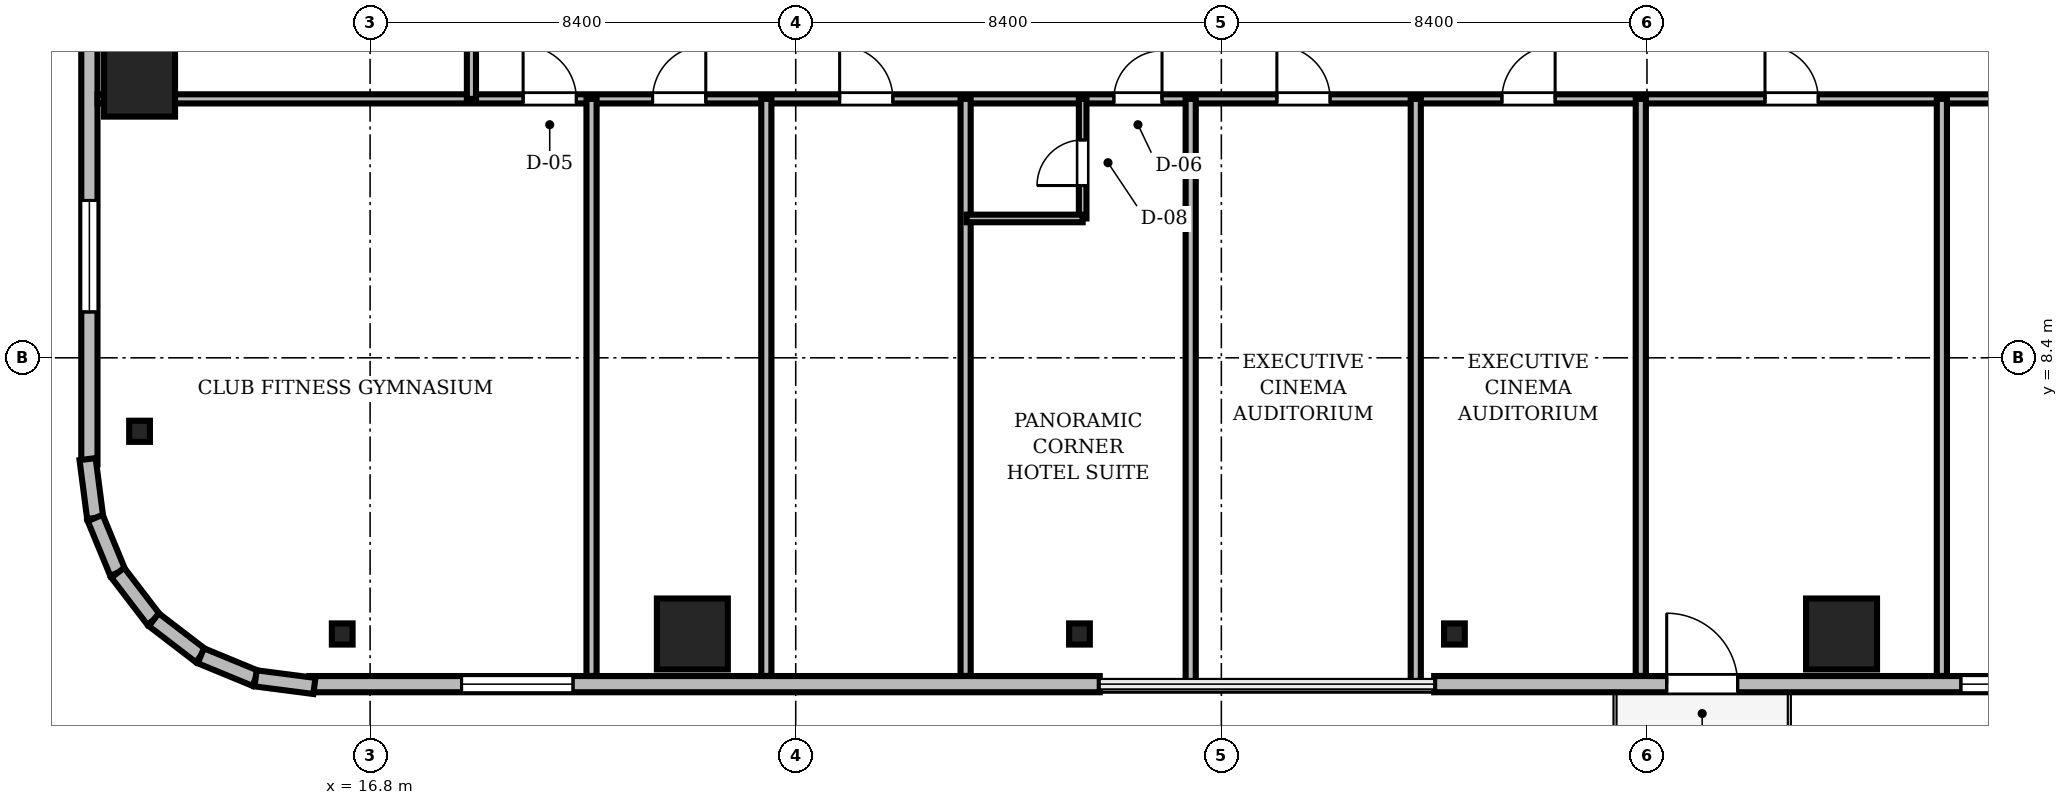
"""IFC4 building model, lengths in metres.
Left out: names, types, materials, properties, quantities, classifications, styles, units other than length and angle.
Written with IfcOpenShell. Run it as: python <this file> out.ifc"""

import sys

from ifc_helpers import new_model, si_unit, direction, frame, frame_2d, origin, origin_2d, place, context, subcontext, project, spatial, rectangle, i_section, extrude, source, transform, mapped, element, fill, save


model = new_model("IFC4")
c1 = context("Model", 3, precision=1e-05, world=origin(), true_north=direction((0.0, 1.0)))
c2 = subcontext(c1, "Body", "Model", "MODEL_VIEW")
j1 = project(units=[si_unit("LENGTHUNIT", "METRE"), si_unit("PLANEANGLEUNIT", "RADIAN")], contexts=[c1])
p1 = place(None, origin())
s1 = spatial("IfcSite", under=j1, at=p1, CompositionType="ELEMENT")
p2 = place(p1, origin())
s2 = spatial("IfcBuilding", under=s1, at=p2, CompositionType="ELEMENT")
p3 = place(p2, frame((0.0, 0.0, 214.8)))
s3 = spatial("IfcBuildingStorey", under=s2, at=p3, CompositionType="ELEMENT", Elevation=214.8)
m1 = source(origin(), c2, "Body", "SweptSolid", [
    extrude(rectangle(XDim=1.4, YDim=1.4, at=origin_2d()), origin(), (0.0, 0.0, 1.0), 3.53),
])
for number, where, z_axis, x_axis in (
    (1, (23.16, 2.95, 0.0), (0.0, 0.0, 1.0), (1.0, 0.0, 0.0)),
    (2, (45.84, 2.95, 0.0), (0.0, 0.0, 1.0), (1.0, 0.0, 0.0)),
    (3, (12.25, 13.86, 0.0), (0.0, 0.0, 1.0), (1.0, 0.0, 0.0)),
):
    element("IfcColumn", number, at=place(p3, frame(where, z_axis=z_axis, x_axis=x_axis)), inside=s3, PredefinedType="COLUMN", context=c2, shape_type="MappedRepresentation", body=[
        mapped(m1, transform((0.0, 0.0, 0.0), scale=1.0)),
    ])
m2 = source(origin(), c2, "Body", "SweptSolid", [
    extrude(i_section(OverallWidth=0.409, OverallDepth=0.417, WebThickness=0.021, FlangeThickness=0.033, FilletRadius=0.015, at=origin_2d()), origin(), (0.0, 0.0, 1.0), 3.53),
])
for number, where, z_axis, x_axis in (
    (4, (16.25, 2.95, 0.0), (0.0, 0.0, 1.0), (1.0, 0.0, 0.0)),
    (5, (30.8, 2.95, 0.0), (0.0, 0.0, 1.0), (1.0, 0.0, 0.0)),
    (6, (38.2, 2.95, 0.0), (0.0, 0.0, 1.0), (1.0, 0.0, 0.0)),
    (7, (12.25, 6.95, 0.0), (0.0, 0.0, 1.0), (1.0, 0.0, 0.0)),
):
    element("IfcColumn", number, at=place(p3, frame(where, z_axis=z_axis, x_axis=x_axis)), inside=s3, PredefinedType="COLUMN", context=c2, shape_type="MappedRepresentation", body=[
        mapped(m2, transform((0.0, 0.0, 0.0), scale=1.0)),
    ])
m3 = source(origin(), c2, "Body", "SweptSolid", [
    extrude(rectangle(XDim=15.6, YDim=0.32, at=frame_2d((7.8, 0.0))), origin(), (0.0, 0.0, 1.0), 3.53),
])
p4 = place(p3, frame((15.6, 1.96, 0.0), z_axis=(0.0, 0.0, 1.0), x_axis=(1.0, 0.0, 0.0)))
e8 = element("IfcWall", 8, at=p4, inside=s3, PredefinedType="SOLIDWALL", context=c2, shape_type="MappedRepresentation", body=[
    mapped(m3, transform((0.0, 0.0, 0.0), scale=1.0)),
])
m4 = source(origin(), c2, "Body", "SweptSolid", [
    extrude(rectangle(XDim=2.2, YDim=2.4, at=frame_2d((1.1, 1.2))), frame((0.0, 0.17, 0.0), z_axis=(0.0, -1.0, 0.0), x_axis=(1.0, 0.0, 0.0)), (0.0, 0.0, 1.0), 0.34),
])
p5 = place(p4, frame((3.005, 0.0, 0.72)))
e9 = element("IfcOpeningElement", 9, at=p5, cuts=e8, PredefinedType="OPENING", context=c2, shape_type="MappedRepresentation", body=[
    mapped(m4, transform((0.0, 0.0, 0.0), scale=1.0)),
])
p6 = place(p3, frame((37.8, 1.96, 0.0), z_axis=(0.0, 0.0, 1.0), x_axis=(1.0, 0.0, 0.0)))
e10 = element("IfcWall", 10, at=p6, inside=s3, PredefinedType="SOLIDWALL", context=c2, shape_type="MappedRepresentation", body=[
    mapped(m3, transform((0.0, 0.0, 0.0), scale=1.0)),
])
m5 = source(origin(), c2, "Body", "SweptSolid", [
    extrude(rectangle(XDim=1.4, YDim=2.3, at=frame_2d((0.7, 1.15))), frame((0.0, 0.17, 0.0), z_axis=(0.0, -1.0, 0.0), x_axis=(1.0, 0.0, 0.0)), (0.0, 0.0, 1.0), 0.34),
])
p7 = place(p6, frame((4.59, 0.0, 0.0)))
e11 = element("IfcOpeningElement", 11, at=p7, cuts=e10, PredefinedType="OPENING", context=c2, shape_type="MappedRepresentation", body=[
    mapped(m5, transform((0.0, 0.0, 0.0), scale=1.0)),
])
p8 = place(p6, frame((10.395, 0.0, 0.72)))
e12 = element("IfcOpeningElement", 12, at=p8, cuts=e10, PredefinedType="OPENING", context=c2, shape_type="MappedRepresentation", body=[
    mapped(m4, transform((0.0, 0.0, 0.0), scale=1.0)),
])
p9 = place(p3, frame((11.26, 21.9, 0.0), z_axis=(0.0, 0.0, 1.0), x_axis=(0.0, -1.0, 0.0)))
e13 = element("IfcWall", 13, at=p9, inside=s3, PredefinedType="SOLIDWALL", context=c2, shape_type="MappedRepresentation", body=[
    mapped(m3, transform((0.0, 0.0, 0.0), scale=1.0)),
])
p10 = place(p9, frame((4.59, 0.0, 0.0)))
e14 = element("IfcOpeningElement", 14, at=p10, cuts=e13, PredefinedType="OPENING", context=c2, shape_type="MappedRepresentation", body=[
    mapped(m5, transform((0.0, 0.0, 0.0), scale=1.0)),
])
p11 = place(p9, frame((10.395, 0.0, 0.72)))
e15 = element("IfcOpeningElement", 15, at=p11, cuts=e13, PredefinedType="OPENING", context=c2, shape_type="MappedRepresentation", body=[
    mapped(m4, transform((0.0, 0.0, 0.0), scale=1.0)),
])
m6 = source(origin(), c2, "Body", "SweptSolid", [
    extrude(rectangle(XDim=1.171, YDim=0.32, at=frame_2d((0.585, 0.0))), origin(), (0.0, 0.0, 1.0), 3.53),
])
p12 = place(p3, frame((11.224, 6.401, 0.0), z_axis=(0.0, 0.0, 1.0), x_axis=(0.128269133229, -0.991739395941, 0.0)))
e16 = element("IfcWall", 16, at=p12, inside=s3, PredefinedType="SOLIDWALL", context=c2, shape_type="MappedRepresentation", body=[
    mapped(m6, transform((0.0, 0.0, 0.0), scale=1.0)),
])
m7 = source(origin(), c2, "Body", "SweptSolid", [
    extrude(rectangle(XDim=1.169, YDim=0.32, at=frame_2d((0.584, 0.0))), origin(), (0.0, 0.0, 1.0), 3.53),
])
for number, where, z_axis, x_axis in (
    (17, (11.375, 5.24, 0.0), (0.0, 0.0, 1.0), (0.381, -0.925, 0.0)),
    (18, (11.82, 4.159, 0.0), (0.0, 0.0, 1.0), (0.608, -0.794, 0.0)),
):
    element("IfcWall", number, at=place(p3, frame(where, z_axis=z_axis, x_axis=x_axis)), inside=s3, PredefinedType="SOLIDWALL", context=c2, shape_type="MappedRepresentation", body=[
        mapped(m7, transform((0.0, 0.0, 0.0), scale=1.0)),
    ])
m8 = source(origin(), c2, "Body", "SweptSolid", [
    extrude(rectangle(XDim=1.169, YDim=0.32, at=frame_2d((0.584, 0.0))), origin(), (0.0, 0.0, 1.0), 3.53),
])
p13 = place(p3, frame((12.531, 3.231, 0.0), z_axis=(0.0, 0.0, 1.0), x_axis=(0.793663520347, -0.608356981114, 0.0)))
e19 = element("IfcWall", 19, at=p13, inside=s3, PredefinedType="SOLIDWALL", context=c2, shape_type="MappedRepresentation", body=[
    mapped(m8, transform((0.0, 0.0, 0.0), scale=1.0)),
])
m9 = source(origin(), c2, "Body", "SweptSolid", [
    extrude(rectangle(XDim=1.169, YDim=0.32, at=frame_2d((0.585, 0.0))), origin(), (0.0, 0.0, 1.0), 3.53),
])
p14 = place(p3, frame((13.459, 2.52, 0.0), z_axis=(0.0, 0.0, 1.0), x_axis=(0.924479075121, -0.381232789334, 0.0)))
e20 = element("IfcWall", 20, at=p14, inside=s3, PredefinedType="SOLIDWALL", context=c2, shape_type="MappedRepresentation", body=[
    mapped(m9, transform((0.0, 0.0, 0.0), scale=1.0)),
])
m10 = source(origin(), c2, "Body", "SweptSolid", [
    extrude(rectangle(XDim=1.17, YDim=0.32, at=frame_2d((0.585, 0.0))), origin(), (0.0, 0.0, 1.0), 3.53),
])
p15 = place(p3, frame((14.54, 2.074, 0.0), z_axis=(0.0, 0.0, 1.0), x_axis=(0.991762485493, -0.128090485085, 0.0)))
e21 = element("IfcWall", 21, at=p15, inside=s3, PredefinedType="SOLIDWALL", context=c2, shape_type="MappedRepresentation", body=[
    mapped(m10, transform((0.0, 0.0, 0.0), scale=1.0)),
])
m11 = source(origin(), c2, "Body", "SweptSolid", [
    extrude(rectangle(XDim=46.156, YDim=0.18, at=frame_2d((23.078, 0.0))), origin(), (0.0, 0.0, 1.0), 2.772),
])
p16 = place(p3, frame((11.422, 13.51, 0.0), z_axis=(0.0, 0.0, 1.0), x_axis=(1.0, 0.0, 0.0)))
e22 = element("IfcWall", 22, at=p16, inside=s3, PredefinedType="PARTITIONING", context=c2, shape_type="MappedRepresentation", body=[
    mapped(m11, transform((0.0, 0.0, 0.0), scale=1.0)),
])
m12 = source(origin(), c2, "Body", "SweptSolid", [
    extrude(rectangle(XDim=1.05, YDim=2.2, at=frame_2d((0.525, 1.1))), frame((0.0, 0.1, 0.0), z_axis=(0.0, -1.0, 0.0), x_axis=(1.0, 0.0, 0.0)), (0.0, 0.0, 1.0), 0.2),
])
p17 = place(p16, frame((8.398, 0.0, 0.0)))
e23 = element("IfcOpeningElement", 23, at=p17, cuts=e22, PredefinedType="OPENING", context=c2, shape_type="MappedRepresentation", body=[
    mapped(m12, transform((0.0, 0.0, 0.0), scale=1.0)),
])
p18 = place(p16, frame((10.953, 0.0, 0.0)))
e24 = element("IfcOpeningElement", 24, at=p18, cuts=e22, PredefinedType="OPENING", context=c2, shape_type="MappedRepresentation", body=[
    mapped(m12, transform((0.0, 0.0, 0.0), scale=1.0)),
])
p19 = place(p16, frame((14.645, 0.0, 0.0)))
e25 = element("IfcOpeningElement", 25, at=p19, cuts=e22, PredefinedType="OPENING", context=c2, shape_type="MappedRepresentation", body=[
    mapped(m12, transform((0.0, 0.0, 0.0), scale=1.0)),
])
m13 = source(origin(), c2, "Body", "SweptSolid", [
    extrude(rectangle(XDim=0.95, YDim=2.15, at=frame_2d((0.475, 1.075))), frame((0.0, 0.1, 0.0), z_axis=(0.0, -1.0, 0.0), x_axis=(1.0, 0.0, 0.0)), (0.0, 0.0, 1.0), 0.2),
])
p20 = place(p16, frame((20.057, 0.0, 0.0)))
e26 = element("IfcOpeningElement", 26, at=p20, cuts=e22, PredefinedType="OPENING", context=c2, shape_type="MappedRepresentation", body=[
    mapped(m13, transform((0.0, 0.0, 0.0), scale=1.0)),
])
p21 = place(p16, frame((23.274, 0.0, 0.0)))
e27 = element("IfcOpeningElement", 27, at=p21, cuts=e22, PredefinedType="OPENING", context=c2, shape_type="MappedRepresentation", body=[
    mapped(m12, transform((0.0, 0.0, 0.0), scale=1.0)),
])
p22 = place(p16, frame((27.716, 0.0, 0.0)))
e28 = element("IfcOpeningElement", 28, at=p22, cuts=e22, PredefinedType="OPENING", context=c2, shape_type="MappedRepresentation", body=[
    mapped(m12, transform((0.0, 0.0, 0.0), scale=1.0)),
])
p23 = place(p16, frame((32.907, 0.0, 0.0)))
e29 = element("IfcOpeningElement", 29, at=p23, cuts=e22, PredefinedType="OPENING", context=c2, shape_type="MappedRepresentation", body=[
    mapped(m12, transform((0.0, 0.0, 0.0), scale=1.0)),
])
p24 = place(p16, frame((37.498, 0.0, 0.0)))
e30 = element("IfcOpeningElement", 30, at=p24, cuts=e22, PredefinedType="OPENING", context=c2, shape_type="MappedRepresentation", body=[
    mapped(m12, transform((0.0, 0.0, 0.0), scale=1.0)),
])
m14 = source(origin(), c2, "Body", "SweptSolid", [
    extrude(rectangle(XDim=15.04, YDim=0.18, at=frame_2d((7.52, 0.0))), origin(), (0.0, 0.0, 1.0), 2.972),
])
p25 = place(p3, frame((18.8, 13.51, 0.0), z_axis=(0.0, 0.0, 1.0), x_axis=(0.0, 1.0, 0.0)))
e31 = element("IfcWall", 31, at=p25, inside=s3, PredefinedType="PARTITIONING", context=c2, shape_type="MappedRepresentation", body=[
    mapped(m14, transform((0.0, 0.0, 0.0), scale=1.0)),
])
p26 = place(p25, frame((1.962, 0.0, 0.0)))
e32 = element("IfcOpeningElement", 32, at=p26, cuts=e31, PredefinedType="OPENING", context=c2, shape_type="MappedRepresentation", body=[
    mapped(m12, transform((0.0, 0.0, 0.0), scale=1.0)),
])
p27 = place(p25, frame((8.15, 0.0, 0.0)))
e33 = element("IfcOpeningElement", 33, at=p27, cuts=e31, PredefinedType="OPENING", context=c2, shape_type="MappedRepresentation", body=[
    mapped(m13, transform((0.0, 0.0, 0.0), scale=1.0)),
])
p28 = place(p25, frame((13.113, 0.0, 0.0)))
e34 = element("IfcOpeningElement", 34, at=p28, cuts=e31, PredefinedType="OPENING", context=c2, shape_type="MappedRepresentation", body=[
    mapped(m13, transform((0.0, 0.0, 0.0), scale=1.0)),
])
m15 = source(origin(), c2, "Body", "SweptSolid", [
    extrude(rectangle(XDim=2.36, YDim=0.15, at=frame_2d((1.18, 0.0))), origin(), (0.0, 0.0, 1.0), 2.972),
])
p29 = place(p3, frame((30.863, 11.15, 0.0), z_axis=(0.0, 0.0, 1.0), x_axis=(0.0, 1.0, 0.0)))
e35 = element("IfcWall", 35, at=p29, inside=s3, PredefinedType="PARTITIONING", context=c2, shape_type="MappedRepresentation", body=[
    mapped(m15, transform((0.0, 0.0, 0.0), scale=1.0)),
])
m16 = source(origin(), c2, "Body", "SweptSolid", [
    extrude(rectangle(XDim=0.9, YDim=2.1, at=frame_2d((0.45, 1.05))), frame((0.0, 0.085, 0.0), z_axis=(0.0, -1.0, 0.0), x_axis=(1.0, 0.0, 0.0)), (0.0, 0.0, 1.0), 0.17),
])
p30 = place(p29, frame((0.65, 0.0, 0.0)))
e36 = element("IfcOpeningElement", 36, at=p30, cuts=e35, PredefinedType="OPENING", context=c2, shape_type="MappedRepresentation", body=[
    mapped(m16, transform((0.0, 0.0, 0.0), scale=1.0)),
])
m17 = source(origin(), c2, "Body", "SweptSolid", [
    extrude(rectangle(XDim=11.388, YDim=0.2, at=frame_2d((5.694, 0.0))), origin(), (0.0, 0.0, 1.0), 2.772),
])
for number, where, z_axis, x_axis in (
    (37, (21.17, 2.122, 0.0), (0.0, 0.0, 1.0), (0.0, 1.0, 0.0)),
    (38, (24.62, 2.122, 0.0), (0.0, 0.0, 1.0), (0.0, 1.0, 0.0)),
    (39, (28.553, 2.122, 0.0), (0.0, 0.0, 1.0), (0.0, 1.0, 0.0)),
):
    element("IfcWall", number, at=place(p3, frame(where, z_axis=z_axis, x_axis=x_axis)), inside=s3, PredefinedType="PARTITIONING", context=c2, shape_type="MappedRepresentation", body=[
        mapped(m17, transform((0.0, 0.0, 0.0), scale=1.0)),
    ])
m18 = source(origin(), c2, "Body", "SweptSolid", [
    extrude(rectangle(XDim=11.58, YDim=0.2, at=frame_2d((5.79, 0.0))), origin(), (0.0, 0.0, 1.0), 2.772),
])
for number, where, z_axis, x_axis in (
    (40, (32.995, 1.93, 0.0), (0.0, 0.0, 1.0), (0.0, 1.0, 0.0)),
    (41, (37.437, 1.93, 0.0), (0.0, 0.0, 1.0), (0.0, 1.0, 0.0)),
):
    element("IfcWall", number, at=place(p3, frame(where, z_axis=z_axis, x_axis=x_axis)), inside=s3, PredefinedType="PARTITIONING", context=c2, shape_type="MappedRepresentation", body=[
        mapped(m18, transform((0.0, 0.0, 0.0), scale=1.0)),
    ])
for number, where, z_axis, x_axis in (
    (42, (41.878, 2.122, 0.0), (0.0, 0.0, 1.0), (0.0, 1.0, 0.0)),
    (43, (47.82, 2.122, 0.0), (0.0, 0.0, 1.0), (0.0, 1.0, 0.0)),
):
    element("IfcWall", number, at=place(p3, frame(where, z_axis=z_axis, x_axis=x_axis)), inside=s3, PredefinedType="PARTITIONING", context=c2, shape_type="MappedRepresentation", body=[
        mapped(m17, transform((0.0, 0.0, 0.0), scale=1.0)),
    ])
m19 = source(origin(), c2, "Body", "SweptSolid", [
    extrude(rectangle(XDim=2.29, YDim=0.15, at=frame_2d((1.145, 0.0))), origin(), (0.0, 0.0, 1.0), 3.53),
])
p31 = place(p3, frame((28.573, 11.15, 0.0), z_axis=(0.0, 0.0, 1.0), x_axis=(1.0, 0.0, 0.0)))
e44 = element("IfcWall", 44, at=p31, inside=s3, PredefinedType="PARTITIONING", context=c2, shape_type="MappedRepresentation", body=[
    mapped(m19, transform((0.0, 0.0, 0.0), scale=1.0)),
])
m20 = source(origin(), c2, "Body", "SweptSolid", [
    extrude(rectangle(XDim=1.4, YDim=2.3, at=frame_2d((0.7, 1.15))), frame((0.0, 0.025, 0.0), z_axis=(0.0, -1.0, 0.0), x_axis=(1.0, 0.0, 0.0)), (0.0, 0.0, 1.0), 0.05),
])
p32 = place(p7, frame((1.4, 0.0, 0.0), z_axis=(0.0, 0.0, 1.0), x_axis=(-1.0, 0.0, 0.0)))
e45 = element("IfcDoor", 45, at=p32, inside=s3, OperationType="DOUBLE_DOOR_SLIDING", PredefinedType="DOOR", context=c2, shape_type="MappedRepresentation", body=[
    mapped(m20, transform((0.0, 0.0, 0.0), scale=1.0)),
])
fill(e11, e45)
m21 = source(origin(), c2, "Body", "SweptSolid", [
    extrude(rectangle(XDim=2.2, YDim=2.4, at=frame_2d((1.1, 1.2))), frame((0.0, 0.03, 0.0), z_axis=(0.0, -1.0, 0.0), x_axis=(1.0, 0.0, 0.0)), (0.0, 0.0, 1.0), 0.06),
])
p33 = place(p5, origin())
e46 = element("IfcWindow", 46, at=p33, inside=s3, PartitioningType="SINGLE_PANEL", PredefinedType="WINDOW", context=c2, shape_type="MappedRepresentation", body=[
    mapped(m21, transform((0.0, 0.0, 0.0), scale=1.0)),
])
fill(e9, e46)
p34 = place(p8, origin())
e47 = element("IfcWindow", 47, at=p34, inside=s3, PartitioningType="SINGLE_PANEL", PredefinedType="WINDOW", context=c2, shape_type="MappedRepresentation", body=[
    mapped(m21, transform((0.0, 0.0, 0.0), scale=1.0)),
])
fill(e12, e47)
p35 = place(p11, origin())
e48 = element("IfcWindow", 48, at=p35, inside=s3, PartitioningType="SINGLE_PANEL", PredefinedType="WINDOW", context=c2, shape_type="MappedRepresentation", body=[
    mapped(m21, transform((0.0, 0.0, 0.0), scale=1.0)),
])
fill(e15, e48)
m22 = source(origin(), c2, "Body", "SweptSolid", [
    extrude(rectangle(XDim=1.05, YDim=2.2, at=frame_2d((0.525, 1.1))), frame((0.0, 0.025, 0.0), z_axis=(0.0, -1.0, 0.0), x_axis=(1.0, 0.0, 0.0)), (0.0, 0.0, 1.0), 0.05),
])
p36 = place(p17, origin())
e49 = element("IfcDoor", 49, at=p36, inside=s3, OperationType="SINGLE_SWING_LEFT", PredefinedType="DOOR", context=c2, shape_type="MappedRepresentation", body=[
    mapped(m22, transform((0.0, 0.0, 0.0), scale=1.0)),
])
fill(e23, e49)
p37 = place(p18, origin())
e50 = element("IfcDoor", 50, at=p37, inside=s3, OperationType="SINGLE_SWING_RIGHT", PredefinedType="DOOR", context=c2, shape_type="MappedRepresentation", body=[
    mapped(m22, transform((0.0, 0.0, 0.0), scale=1.0)),
])
fill(e24, e50)
p38 = place(p19, origin())
e51 = element("IfcDoor", 51, at=p38, inside=s3, OperationType="SINGLE_SWING_LEFT", PredefinedType="DOOR", context=c2, shape_type="MappedRepresentation", body=[
    mapped(m22, transform((0.0, 0.0, 0.0), scale=1.0)),
])
fill(e25, e51)
m23 = source(origin(), c2, "Body", "SweptSolid", [
    extrude(rectangle(XDim=0.95, YDim=2.15, at=frame_2d((0.475, 1.075))), frame((0.0, 0.025, 0.0), z_axis=(0.0, -1.0, 0.0), x_axis=(1.0, 0.0, 0.0)), (0.0, 0.0, 1.0), 0.05),
])
p39 = place(p20, origin())
e52 = element("IfcDoor", 52, at=p39, inside=s3, OperationType="SINGLE_SWING_RIGHT", PredefinedType="DOOR", context=c2, shape_type="MappedRepresentation", body=[
    mapped(m23, transform((0.0, 0.0, 0.0), scale=1.0)),
])
fill(e26, e52)
p40 = place(p21, origin())
e53 = element("IfcDoor", 53, at=p40, inside=s3, OperationType="SINGLE_SWING_LEFT", PredefinedType="DOOR", context=c2, shape_type="MappedRepresentation", body=[
    mapped(m22, transform((0.0, 0.0, 0.0), scale=1.0)),
])
fill(e27, e53)
p41 = place(p22, origin())
e54 = element("IfcDoor", 54, at=p41, inside=s3, OperationType="SINGLE_SWING_RIGHT", PredefinedType="DOOR", context=c2, shape_type="MappedRepresentation", body=[
    mapped(m22, transform((0.0, 0.0, 0.0), scale=1.0)),
])
fill(e28, e54)
p42 = place(p23, origin())
e55 = element("IfcDoor", 55, at=p42, inside=s3, OperationType="SINGLE_SWING_LEFT", PredefinedType="DOOR", context=c2, shape_type="MappedRepresentation", body=[
    mapped(m22, transform((0.0, 0.0, 0.0), scale=1.0)),
])
fill(e29, e55)
m24 = source(origin(), c2, "Body", "SweptSolid", [
    extrude(rectangle(XDim=0.9, YDim=2.1, at=frame_2d((0.45, 1.05))), frame((0.0, 0.025, 0.0), z_axis=(0.0, -1.0, 0.0), x_axis=(1.0, 0.0, 0.0)), (0.0, 0.0, 1.0), 0.05),
])
p43 = place(p30, origin())
e56 = element("IfcDoor", 56, at=p43, inside=s3, OperationType="SINGLE_SWING_LEFT", PredefinedType="DOOR", context=c2, shape_type="MappedRepresentation", body=[
    mapped(m24, transform((0.0, 0.0, 0.0), scale=1.0)),
])
fill(e36, e56)
save(model, sys.argv[1])
